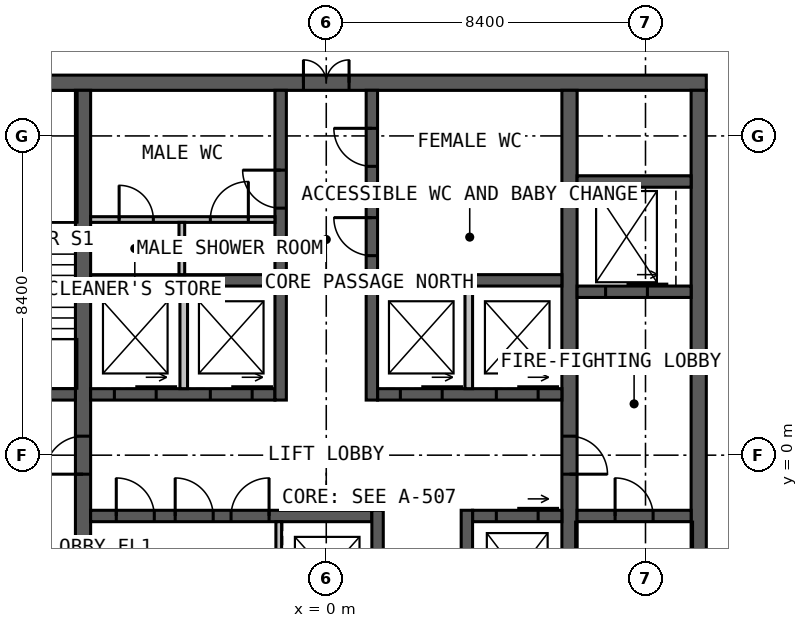
"""IFC4 building model, lengths in metres.
Left out: names, types, materials, properties, quantities, classifications, styles, units other than length and angle.
Written with IfcOpenShell. Run it as: python <this file> out.ifc"""

import sys

from ifc_helpers import new_model, si_unit, direction, frame, frame_2d, origin, place, context, subcontext, project, spatial, rectangle, extrude, element, fill, save


model = new_model("IFC4")
c1 = context("Model", 3, precision=1e-05, world=origin(), true_north=direction((0.0, 1.0)))
c2 = subcontext(c1, "Body", "Model", "MODEL_VIEW")
j1 = project(units=[si_unit("LENGTHUNIT", "METRE"), si_unit("PLANEANGLEUNIT", "RADIAN")], contexts=[c1])
p1 = place(None, origin())
s1 = spatial("IfcSite", under=j1, at=p1, CompositionType="ELEMENT")
p2 = place(p1, origin())
s2 = spatial("IfcBuilding", under=s1, at=p2, CompositionType="ELEMENT")
p3 = place(p2, frame((0.0, 0.0, 244.0)))
s3 = spatial("IfcBuildingStorey", under=s2, at=p3, CompositionType="ELEMENT", Elevation=244.0)
p4 = place(p3, frame((-10.0, 9.8, 0.0), z_axis=(0.0, 0.0, 1.0), x_axis=(1.0, 0.0, 0.0)))
e1 = element("IfcWall", 1, at=p4, inside=s3, PredefinedType="SOLIDWALL", context=c2, shape_type="SweptSolid", body=[
    extrude(rectangle(XDim=20.0, YDim=0.4, at=frame_2d((10.0, 0.0))), origin(), (0.0, 0.0, 1.0), 4.0),
])
p5 = place(p4, frame((9.4, 0.0, 0.0)))
e2 = element("IfcOpeningElement", 2, at=p5, cuts=e1, PredefinedType="OPENING", context=c2, shape_type="SweptSolid", body=[
    extrude(rectangle(XDim=1.2, YDim=2.2, at=frame_2d((0.6, 1.1))), frame((0.0, 0.21, 0.0), z_axis=(0.0, -1.0, 0.0), x_axis=(1.0, 0.0, 0.0)), (0.0, 0.0, 1.0), 0.42),
])
p6 = place(p3, frame((9.8, -9.6, 0.0), z_axis=(0.0, 0.0, 1.0), x_axis=(0.0, 1.0, 0.0)))
e3 = element("IfcWall", 3, at=p6, inside=s3, PredefinedType="SOLIDWALL", context=c2, shape_type="SweptSolid", body=[
    extrude(rectangle(XDim=19.2, YDim=0.4, at=frame_2d((9.6, 0.0))), origin(), (0.0, 0.0, 1.0), 4.0),
])
p7 = place(p3, frame((-6.4, -9.6, 0.0), z_axis=(0.0, 0.0, 1.0), x_axis=(0.0, 1.0, 0.0)))
e4 = element("IfcWall", 4, at=p7, inside=s3, PredefinedType="SOLIDWALL", context=c2, shape_type="SweptSolid", body=[
    extrude(rectangle(XDim=19.2, YDim=0.4, at=frame_2d((9.6, 0.0))), origin(), (0.0, 0.0, 1.0), 4.0),
])
p8 = place(p7, frame((9.1, 0.0, 0.0)))
e5 = element("IfcOpeningElement", 5, at=p8, cuts=e4, PredefinedType="OPENING", context=c2, shape_type="SweptSolid", body=[
    extrude(rectangle(XDim=1.0, YDim=2.2, at=frame_2d((0.5, 1.1))), frame((0.0, 0.21, 0.0), z_axis=(0.0, -1.0, 0.0), x_axis=(1.0, 0.0, 0.0)), (0.0, 0.0, 1.0), 0.42),
])
p9 = place(p3, frame((6.4, 9.6, 0.0), z_axis=(0.0, 0.0, 1.0), x_axis=(0.0, -1.0, 0.0)))
e6 = element("IfcWall", 6, at=p9, inside=s3, PredefinedType="SOLIDWALL", context=c2, shape_type="SweptSolid", body=[
    extrude(rectangle(XDim=19.2, YDim=0.4, at=frame_2d((9.6, 0.0))), origin(), (0.0, 0.0, 1.0), 4.0),
])
p10 = place(p9, frame((9.1, 0.0, 0.0)))
e7 = element("IfcOpeningElement", 7, at=p10, cuts=e6, PredefinedType="OPENING", context=c2, shape_type="SweptSolid", body=[
    extrude(rectangle(XDim=1.0, YDim=2.2, at=frame_2d((0.5, 1.1))), frame((0.0, 0.21, 0.0), z_axis=(0.0, -1.0, 0.0), x_axis=(1.0, 0.0, 0.0)), (0.0, 0.0, 1.0), 0.42),
])
p11 = place(p3, frame((-6.2, 1.6, 0.0), z_axis=(0.0, 0.0, 1.0), x_axis=(1.0, 0.0, 0.0)))
e8 = element("IfcWall", 8, at=p11, inside=s3, PredefinedType="SOLIDWALL", context=c2, shape_type="SweptSolid", body=[
    extrude(rectangle(XDim=4.85, YDim=0.3, at=frame_2d((2.425, 0.0))), origin(), (0.0, 0.0, 1.0), 4.0),
])
p12 = place(p11, frame((0.625, 0.0, 0.0)))
e9 = element("IfcOpeningElement", 9, at=p12, cuts=e8, PredefinedType="OPENING", context=c2, shape_type="SweptSolid", body=[
    extrude(rectangle(XDim=1.1, YDim=2.2, at=frame_2d((0.55, 1.1))), frame((0.0, 0.16, 0.0), z_axis=(0.0, -1.0, 0.0), x_axis=(1.0, 0.0, 0.0)), (0.0, 0.0, 1.0), 0.32),
])
p13 = place(p11, frame((3.15, 0.0, 0.0)))
e10 = element("IfcOpeningElement", 10, at=p13, cuts=e8, PredefinedType="OPENING", context=c2, shape_type="SweptSolid", body=[
    extrude(rectangle(XDim=1.1, YDim=2.2, at=frame_2d((0.55, 1.1))), frame((0.0, 0.16, 0.0), z_axis=(0.0, -1.0, 0.0), x_axis=(1.0, 0.0, 0.0)), (0.0, 0.0, 1.0), 0.32),
])
p14 = place(p3, frame((1.35, 1.6, 0.0), z_axis=(0.0, 0.0, 1.0), x_axis=(1.0, 0.0, 0.0)))
e11 = element("IfcWall", 11, at=p14, inside=s3, PredefinedType="SOLIDWALL", context=c2, shape_type="SweptSolid", body=[
    extrude(rectangle(XDim=4.85, YDim=0.3, at=frame_2d((2.425, 0.0))), origin(), (0.0, 0.0, 1.0), 4.0),
])
p15 = place(p14, frame((0.6, 0.0, 0.0)))
e12 = element("IfcOpeningElement", 12, at=p15, cuts=e11, PredefinedType="OPENING", context=c2, shape_type="SweptSolid", body=[
    extrude(rectangle(XDim=1.1, YDim=2.2, at=frame_2d((0.55, 1.1))), frame((0.0, 0.16, 0.0), z_axis=(0.0, -1.0, 0.0), x_axis=(1.0, 0.0, 0.0)), (0.0, 0.0, 1.0), 0.32),
])
p16 = place(p14, frame((3.125, 0.0, 0.0)))
e13 = element("IfcOpeningElement", 13, at=p16, cuts=e11, PredefinedType="OPENING", context=c2, shape_type="SweptSolid", body=[
    extrude(rectangle(XDim=1.1, YDim=2.2, at=frame_2d((0.55, 1.1))), frame((0.0, 0.16, 0.0), z_axis=(0.0, -1.0, 0.0), x_axis=(1.0, 0.0, 0.0)), (0.0, 0.0, 1.0), 0.32),
])
for number, where, z_axis, x_axis in (
    (14, (-6.2, 4.6, 0.0), (0.0, 0.0, 1.0), (1.0, 0.0, 0.0)),
    (15, (1.35, 4.6, 0.0), (0.0, 0.0, 1.0), (1.0, 0.0, 0.0)),
):
    element("IfcWall", number, at=place(p3, frame(where, z_axis=z_axis, x_axis=x_axis)), inside=s3, PredefinedType="SOLIDWALL", context=c2, shape_type="SweptSolid", body=[
        extrude(rectangle(XDim=4.85, YDim=0.3, at=frame_2d((2.425, 0.0))), origin(), (0.0, 0.0, 1.0), 4.0),
    ])
p17 = place(p3, frame((-1.2, 1.45, 0.0), z_axis=(0.0, 0.0, 1.0), x_axis=(0.0, 1.0, 0.0)))
e16 = element("IfcWall", 16, at=p17, inside=s3, PredefinedType="SOLIDWALL", context=c2, shape_type="SweptSolid", body=[
    extrude(rectangle(XDim=8.15, YDim=0.3, at=frame_2d((4.075, 0.0))), origin(), (0.0, 0.0, 1.0), 4.0),
])
p18 = place(p17, frame((5.05, 0.0, 0.0)))
e17 = element("IfcOpeningElement", 17, at=p18, cuts=e16, PredefinedType="OPENING", context=c2, shape_type="SweptSolid", body=[
    extrude(rectangle(XDim=1.0, YDim=2.2, at=frame_2d((0.5, 1.1))), frame((0.0, 0.16, 0.0), z_axis=(0.0, -1.0, 0.0), x_axis=(1.0, 0.0, 0.0)), (0.0, 0.0, 1.0), 0.32),
])
p19 = place(p3, frame((1.2, 1.45, 0.0), z_axis=(0.0, 0.0, 1.0), x_axis=(0.0, 1.0, 0.0)))
e18 = element("IfcWall", 18, at=p19, inside=s3, PredefinedType="SOLIDWALL", context=c2, shape_type="SweptSolid", body=[
    extrude(rectangle(XDim=8.15, YDim=0.3, at=frame_2d((4.075, 0.0))), origin(), (0.0, 0.0, 1.0), 4.0),
])
p20 = place(p19, frame((3.8, 0.0, 0.0)))
e19 = element("IfcOpeningElement", 19, at=p20, cuts=e18, PredefinedType="OPENING", context=c2, shape_type="SweptSolid", body=[
    extrude(rectangle(XDim=1.0, YDim=2.2, at=frame_2d((0.5, 1.1))), frame((0.0, 0.16, 0.0), z_axis=(0.0, -1.0, 0.0), x_axis=(1.0, 0.0, 0.0)), (0.0, 0.0, 1.0), 0.32),
])
p21 = place(p19, frame((6.15, 0.0, 0.0)))
e20 = element("IfcOpeningElement", 20, at=p21, cuts=e18, PredefinedType="OPENING", context=c2, shape_type="SweptSolid", body=[
    extrude(rectangle(XDim=1.0, YDim=2.2, at=frame_2d((0.5, 1.1))), frame((0.0, 0.16, 0.0), z_axis=(0.0, -1.0, 0.0), x_axis=(1.0, 0.0, 0.0)), (0.0, 0.0, 1.0), 0.32),
])
p22 = place(p3, frame((-6.2, -1.6, 0.0), z_axis=(0.0, 0.0, 1.0), x_axis=(1.0, 0.0, 0.0)))
e21 = element("IfcWall", 21, at=p22, inside=s3, PredefinedType="SOLIDWALL", context=c2, shape_type="SweptSolid", body=[
    extrude(rectangle(XDim=7.4, YDim=0.3, at=frame_2d((3.7, 0.0))), origin(), (0.0, 0.0, 1.0), 4.0),
])
p23 = place(p22, frame((0.675, 0.0, 0.0)))
e22 = element("IfcOpeningElement", 22, at=p23, cuts=e21, PredefinedType="OPENING", context=c2, shape_type="SweptSolid", body=[
    extrude(rectangle(XDim=1.0, YDim=2.2, at=frame_2d((0.5, 1.1))), frame((0.0, 0.16, 0.0), z_axis=(0.0, -1.0, 0.0), x_axis=(1.0, 0.0, 0.0)), (0.0, 0.0, 1.0), 0.32),
])
p24 = place(p22, frame((2.225, 0.0, 0.0)))
e23 = element("IfcOpeningElement", 23, at=p24, cuts=e21, PredefinedType="OPENING", context=c2, shape_type="SweptSolid", body=[
    extrude(rectangle(XDim=1.0, YDim=2.2, at=frame_2d((0.5, 1.1))), frame((0.0, 0.16, 0.0), z_axis=(0.0, -1.0, 0.0), x_axis=(1.0, 0.0, 0.0)), (0.0, 0.0, 1.0), 0.32),
])
p25 = place(p22, frame((3.695, 0.0, 0.0)))
e24 = element("IfcOpeningElement", 24, at=p25, cuts=e21, PredefinedType="OPENING", context=c2, shape_type="SweptSolid", body=[
    extrude(rectangle(XDim=1.0, YDim=2.2, at=frame_2d((0.5, 1.1))), frame((0.0, 0.16, 0.0), z_axis=(0.0, -1.0, 0.0), x_axis=(1.0, 0.0, 0.0)), (0.0, 0.0, 1.0), 0.32),
])
p26 = place(p3, frame((3.85, -1.6, 0.0), z_axis=(0.0, 0.0, 1.0), x_axis=(1.0, 0.0, 0.0)))
e25 = element("IfcWall", 25, at=p26, inside=s3, PredefinedType="SOLIDWALL", context=c2, shape_type="SweptSolid", body=[
    extrude(rectangle(XDim=2.35, YDim=0.3, at=frame_2d((1.175, 0.0))), origin(), (0.0, 0.0, 1.0), 4.0),
])
p27 = place(p26, frame((0.625, 0.0, 0.0)))
e26 = element("IfcOpeningElement", 26, at=p27, cuts=e25, PredefinedType="OPENING", context=c2, shape_type="SweptSolid", body=[
    extrude(rectangle(XDim=1.1, YDim=2.2, at=frame_2d((0.55, 1.1))), frame((0.0, 0.16, 0.0), z_axis=(0.0, -1.0, 0.0), x_axis=(1.0, 0.0, 0.0)), (0.0, 0.0, 1.0), 0.32),
])
p28 = place(p3, frame((1.35, -1.45, 0.0), z_axis=(0.0, 0.0, 1.0), x_axis=(0.0, -1.0, 0.0)))
e27 = element("IfcWall", 27, at=p28, inside=s3, PredefinedType="SOLIDWALL", context=c2, shape_type="SweptSolid", body=[
    extrude(rectangle(XDim=8.15, YDim=0.3, at=frame_2d((4.075, 0.0))), origin(), (0.0, 0.0, 1.0), 4.0),
])
p29 = place(p28, frame((6.0, 0.0, 0.0)))
e28 = element("IfcOpeningElement", 28, at=p29, cuts=e27, PredefinedType="OPENING", context=c2, shape_type="SweptSolid", body=[
    extrude(rectangle(XDim=1.0, YDim=2.2, at=frame_2d((0.5, 1.1))), frame((0.0, 0.16, 0.0), z_axis=(0.0, -1.0, 0.0), x_axis=(1.0, 0.0, 0.0)), (0.0, 0.0, 1.0), 0.32),
])
p30 = place(p28, frame((3.525, 0.0, 0.0)))
e29 = element("IfcOpeningElement", 29, at=p30, cuts=e27, PredefinedType="OPENING", context=c2, shape_type="SweptSolid", body=[
    extrude(rectangle(XDim=0.9, YDim=2.2, at=frame_2d((0.45, 1.1))), frame((0.0, 0.16, 0.0), z_axis=(0.0, -1.0, 0.0), x_axis=(1.0, 0.0, 0.0)), (0.0, 0.0, 1.0), 0.32),
])
p31 = place(p3, frame((3.7, -1.45, 0.0), z_axis=(0.0, 0.0, 1.0), x_axis=(0.0, -1.0, 0.0)))
e30 = element("IfcWall", 30, at=p31, inside=s3, PredefinedType="SOLIDWALL", context=c2, shape_type="SweptSolid", body=[
    extrude(rectangle(XDim=8.15, YDim=0.3, at=frame_2d((4.075, 0.0))), origin(), (0.0, 0.0, 1.0), 4.0),
])
p32 = place(p31, frame((5.1, 0.0, 0.0)))
e31 = element("IfcOpeningElement", 31, at=p32, cuts=e30, PredefinedType="OPENING", context=c2, shape_type="SweptSolid", body=[
    extrude(rectangle(XDim=0.9, YDim=2.2, at=frame_2d((0.45, 1.1))), frame((0.0, 0.16, 0.0), z_axis=(0.0, -1.0, 0.0), x_axis=(1.0, 0.0, 0.0)), (0.0, 0.0, 1.0), 0.32),
])
p33 = place(p3, frame((-9.6, 1.6, 0.0), z_axis=(0.0, 0.0, 1.0), x_axis=(1.0, 0.0, 0.0)))
e32 = element("IfcWall", 32, at=p33, inside=s3, PredefinedType="SOLIDWALL", context=c2, shape_type="SweptSolid", body=[
    extrude(rectangle(XDim=3.0, YDim=0.3, at=frame_2d((1.5, 0.0))), origin(), (0.0, 0.0, 1.0), 4.0),
])
p34 = place(p33, frame((1.0, 0.0, 0.0)))
e33 = element("IfcOpeningElement", 33, at=p34, cuts=e32, PredefinedType="OPENING", context=c2, shape_type="SweptSolid", body=[
    extrude(rectangle(XDim=1.0, YDim=2.2, at=frame_2d((0.5, 1.1))), frame((0.0, 0.16, 0.0), z_axis=(0.0, -1.0, 0.0), x_axis=(1.0, 0.0, 0.0)), (0.0, 0.0, 1.0), 0.32),
])
p35 = place(p3, frame((6.6, -1.6, 0.0), z_axis=(0.0, 0.0, 1.0), x_axis=(1.0, 0.0, 0.0)))
e34 = element("IfcWall", 34, at=p35, inside=s3, PredefinedType="SOLIDWALL", context=c2, shape_type="SweptSolid", body=[
    extrude(rectangle(XDim=3.0, YDim=0.3, at=frame_2d((1.5, 0.0))), origin(), (0.0, 0.0, 1.0), 4.0),
])
p36 = place(p35, frame((1.0, 0.0, 0.0)))
e35 = element("IfcOpeningElement", 35, at=p36, cuts=e34, PredefinedType="OPENING", context=c2, shape_type="SweptSolid", body=[
    extrude(rectangle(XDim=1.0, YDim=2.2, at=frame_2d((0.5, 1.1))), frame((0.0, 0.16, 0.0), z_axis=(0.0, -1.0, 0.0), x_axis=(1.0, 0.0, 0.0)), (0.0, 0.0, 1.0), 0.32),
])
p37 = place(p3, frame((6.6, 4.3, 0.0), z_axis=(0.0, 0.0, 1.0), x_axis=(1.0, 0.0, 0.0)))
e36 = element("IfcWall", 36, at=p37, inside=s3, PredefinedType="SOLIDWALL", context=c2, shape_type="SweptSolid", body=[
    extrude(rectangle(XDim=3.0, YDim=0.3, at=frame_2d((1.5, 0.0))), origin(), (0.0, 0.0, 1.0), 4.0),
])
p38 = place(p37, frame((0.75, 0.0, 0.0)))
e37 = element("IfcOpeningElement", 37, at=p38, cuts=e36, PredefinedType="OPENING", context=c2, shape_type="SweptSolid", body=[
    extrude(rectangle(XDim=1.1, YDim=2.2, at=frame_2d((0.55, 1.1))), frame((0.0, 0.16, 0.0), z_axis=(0.0, -1.0, 0.0), x_axis=(1.0, 0.0, 0.0)), (0.0, 0.0, 1.0), 0.32),
])
p39 = place(p3, frame((6.6, 7.2, 0.0), z_axis=(0.0, 0.0, 1.0), x_axis=(1.0, 0.0, 0.0)))
e38 = element("IfcWall", 38, at=p39, inside=s3, PredefinedType="SOLIDWALL", context=c2, shape_type="SweptSolid", body=[
    extrude(rectangle(XDim=3.0, YDim=0.3, at=frame_2d((1.5, 0.0))), origin(), (0.0, 0.0, 1.0), 4.0),
])
for number, where, z_axis, x_axis in (
    (39, (-3.75, 1.75, 0.0), (0.0, 0.0, 1.0), (0.0, 1.0, 0.0)),
    (40, (3.75, 1.75, 0.0), (0.0, 0.0, 1.0), (0.0, 1.0, 0.0)),
):
    element("IfcWall", number, at=place(p3, frame(where, z_axis=z_axis, x_axis=x_axis)), inside=s3, PredefinedType="SOLIDWALL", context=c2, shape_type="SweptSolid", body=[
        extrude(rectangle(XDim=2.7, YDim=0.2, at=frame_2d((1.35, 0.0))), origin(), (0.0, 0.0, 1.0), 3.75),
    ])
p40 = place(p3, frame((1.35, 6.8, 0.0), z_axis=(0.0, 0.0, 1.0), x_axis=(1.0, 0.0, 0.0)))
e41 = element("IfcWall", 41, at=p40, inside=s3, PredefinedType="PARTITIONING", context=c2, shape_type="SweptSolid", body=[
    extrude(rectangle(XDim=4.85, YDim=0.15, at=frame_2d((2.425, 0.0))), origin(), (0.0, 0.0, 1.0), 3.75),
])
p41 = place(p3, frame((-6.2, 6.2, 0.0), z_axis=(0.0, 0.0, 1.0), x_axis=(1.0, 0.0, 0.0)))
e42 = element("IfcWall", 42, at=p41, inside=s3, PredefinedType="PARTITIONING", context=c2, shape_type="SweptSolid", body=[
    extrude(rectangle(XDim=4.85, YDim=0.15, at=frame_2d((2.425, 0.0))), origin(), (0.0, 0.0, 1.0), 3.75),
])
p42 = place(p41, frame((3.15, 0.0, 0.0)))
e43 = element("IfcOpeningElement", 43, at=p42, cuts=e42, PredefinedType="OPENING", context=c2, shape_type="SweptSolid", body=[
    extrude(rectangle(XDim=1.0, YDim=2.2, at=frame_2d((0.5, 1.1))), frame((0.0, 0.085, 0.0), z_axis=(0.0, -1.0, 0.0), x_axis=(1.0, 0.0, 0.0)), (0.0, 0.0, 1.0), 0.17),
])
p43 = place(p41, frame((0.75, 0.0, 0.0)))
e44 = element("IfcOpeningElement", 44, at=p43, cuts=e42, PredefinedType="OPENING", context=c2, shape_type="SweptSolid", body=[
    extrude(rectangle(XDim=0.9, YDim=2.2, at=frame_2d((0.45, 1.1))), frame((0.0, 0.085, 0.0), z_axis=(0.0, -1.0, 0.0), x_axis=(1.0, 0.0, 0.0)), (0.0, 0.0, 1.0), 0.17),
])
p44 = place(p3, frame((-3.8, 4.75, 0.0), z_axis=(0.0, 0.0, 1.0), x_axis=(0.0, 1.0, 0.0)))
e45 = element("IfcWall", 45, at=p44, inside=s3, PredefinedType="PARTITIONING", context=c2, shape_type="SweptSolid", body=[
    extrude(rectangle(XDim=1.375, YDim=0.15, at=frame_2d((0.688, 0.0))), origin(), (0.0, 0.0, 1.0), 3.75),
])
p45 = place(p3, frame((-1.25, -1.75, 0.0), z_axis=(0.0, 0.0, 1.0), x_axis=(0.0, -1.0, 0.0)))
e46 = element("IfcWall", 46, at=p45, inside=s3, PredefinedType="PARTITIONING", context=c2, shape_type="SweptSolid", body=[
    extrude(rectangle(XDim=2.7, YDim=0.15, at=frame_2d((1.35, 0.0))), origin(), (0.0, 0.0, 1.0), 3.75),
])
p46 = place(p5, origin())
e47 = element("IfcDoor", 47, at=p46, inside=s3, OperationType="DOUBLE_DOOR_SINGLE_SWING", PredefinedType="DOOR", context=c2, shape_type="SweptSolid", body=[
    extrude(rectangle(XDim=1.2, YDim=2.2, at=frame_2d((0.6, 1.1))), frame((0.0, 0.025, 0.0), z_axis=(0.0, -1.0, 0.0), x_axis=(1.0, 0.0, 0.0)), (0.0, 0.0, 1.0), 0.05),
])
fill(e2, e47)
p47 = place(p8, origin())
e48 = element("IfcDoor", 48, at=p47, inside=s3, OperationType="SINGLE_SWING_LEFT", PredefinedType="DOOR", context=c2, shape_type="SweptSolid", body=[
    extrude(rectangle(XDim=1.0, YDim=2.2, at=frame_2d((0.5, 1.1))), frame((0.0, 0.025, 0.0), z_axis=(0.0, -1.0, 0.0), x_axis=(1.0, 0.0, 0.0)), (0.0, 0.0, 1.0), 0.05),
])
fill(e5, e48)
p48 = place(p10, origin())
e49 = element("IfcDoor", 49, at=p48, inside=s3, OperationType="SINGLE_SWING_RIGHT", PredefinedType="DOOR", context=c2, shape_type="SweptSolid", body=[
    extrude(rectangle(XDim=1.0, YDim=2.2, at=frame_2d((0.5, 1.1))), frame((0.0, 0.025, 0.0), z_axis=(0.0, -1.0, 0.0), x_axis=(1.0, 0.0, 0.0)), (0.0, 0.0, 1.0), 0.05),
])
fill(e7, e49)
p49 = place(p36, origin())
e50 = element("IfcDoor", 50, at=p49, inside=s3, OperationType="SINGLE_SWING_LEFT", PredefinedType="DOOR", context=c2, shape_type="SweptSolid", body=[
    extrude(rectangle(XDim=1.0, YDim=2.2, at=frame_2d((0.5, 1.1))), frame((0.0, 0.025, 0.0), z_axis=(0.0, -1.0, 0.0), x_axis=(1.0, 0.0, 0.0)), (0.0, 0.0, 1.0), 0.05),
])
fill(e35, e50)
p50 = place(p18, origin())
e51 = element("IfcDoor", 51, at=p50, inside=s3, OperationType="SINGLE_SWING_RIGHT", PredefinedType="DOOR", context=c2, shape_type="SweptSolid", body=[
    extrude(rectangle(XDim=1.0, YDim=2.2, at=frame_2d((0.5, 1.1))), frame((0.0, 0.025, 0.0), z_axis=(0.0, -1.0, 0.0), x_axis=(1.0, 0.0, 0.0)), (0.0, 0.0, 1.0), 0.05),
])
fill(e17, e51)
p51 = place(p20, origin())
e52 = element("IfcDoor", 52, at=p51, inside=s3, OperationType="SINGLE_SWING_RIGHT", PredefinedType="DOOR", context=c2, shape_type="SweptSolid", body=[
    extrude(rectangle(XDim=1.0, YDim=2.2, at=frame_2d((0.5, 1.1))), frame((0.0, 0.025, 0.0), z_axis=(0.0, -1.0, 0.0), x_axis=(1.0, 0.0, 0.0)), (0.0, 0.0, 1.0), 0.05),
])
fill(e19, e52)
p52 = place(p21, origin())
e53 = element("IfcDoor", 53, at=p52, inside=s3, OperationType="SINGLE_SWING_RIGHT", PredefinedType="DOOR", context=c2, shape_type="SweptSolid", body=[
    extrude(rectangle(XDim=1.0, YDim=2.2, at=frame_2d((0.5, 1.1))), frame((0.0, 0.025, 0.0), z_axis=(0.0, -1.0, 0.0), x_axis=(1.0, 0.0, 0.0)), (0.0, 0.0, 1.0), 0.05),
])
fill(e20, e53)
p53 = place(p42, origin())
e54 = element("IfcDoor", 54, at=p53, inside=s3, OperationType="SINGLE_SWING_RIGHT", PredefinedType="DOOR", context=c2, shape_type="SweptSolid", body=[
    extrude(rectangle(XDim=1.0, YDim=2.2, at=frame_2d((0.5, 1.1))), frame((0.0, 0.025, 0.0), z_axis=(0.0, -1.0, 0.0), x_axis=(1.0, 0.0, 0.0)), (0.0, 0.0, 1.0), 0.05),
])
fill(e43, e54)
p54 = place(p43, origin())
e55 = element("IfcDoor", 55, at=p54, inside=s3, OperationType="SINGLE_SWING_LEFT", PredefinedType="DOOR", context=c2, shape_type="SweptSolid", body=[
    extrude(rectangle(XDim=0.9, YDim=2.2, at=frame_2d((0.45, 1.1))), frame((0.0, 0.025, 0.0), z_axis=(0.0, -1.0, 0.0), x_axis=(1.0, 0.0, 0.0)), (0.0, 0.0, 1.0), 0.05),
])
fill(e44, e55)
p55 = place(p23, origin())
e56 = element("IfcDoor", 56, at=p55, inside=s3, OperationType="SINGLE_SWING_LEFT", PredefinedType="DOOR", context=c2, shape_type="SweptSolid", body=[
    extrude(rectangle(XDim=1.0, YDim=2.2, at=frame_2d((0.5, 1.1))), frame((0.0, 0.025, 0.0), z_axis=(0.0, -1.0, 0.0), x_axis=(1.0, 0.0, 0.0)), (0.0, 0.0, 1.0), 0.05),
])
fill(e22, e56)
p56 = place(p24, origin())
e57 = element("IfcDoor", 57, at=p56, inside=s3, OperationType="SINGLE_SWING_LEFT", PredefinedType="DOOR", context=c2, shape_type="SweptSolid", body=[
    extrude(rectangle(XDim=1.0, YDim=2.2, at=frame_2d((0.5, 1.1))), frame((0.0, 0.025, 0.0), z_axis=(0.0, -1.0, 0.0), x_axis=(1.0, 0.0, 0.0)), (0.0, 0.0, 1.0), 0.05),
])
fill(e23, e57)
p57 = place(p25, origin())
e58 = element("IfcDoor", 58, at=p57, inside=s3, OperationType="SINGLE_SWING_RIGHT", PredefinedType="DOOR", context=c2, shape_type="SweptSolid", body=[
    extrude(rectangle(XDim=1.0, YDim=2.2, at=frame_2d((0.5, 1.1))), frame((0.0, 0.025, 0.0), z_axis=(0.0, -1.0, 0.0), x_axis=(1.0, 0.0, 0.0)), (0.0, 0.0, 1.0), 0.05),
])
fill(e24, e58)
p58 = place(p12, origin())
e59 = element("IfcDoor", 59, at=p58, inside=s3, OperationType="SLIDING_TO_LEFT", PredefinedType="DOOR", context=c2, shape_type="SweptSolid", body=[
    extrude(rectangle(XDim=1.1, YDim=2.2, at=frame_2d((0.55, 1.1))), frame((0.0, 0.025, 0.0), z_axis=(0.0, -1.0, 0.0), x_axis=(1.0, 0.0, 0.0)), (0.0, 0.0, 1.0), 0.05),
])
fill(e9, e59)
p59 = place(p13, origin())
e60 = element("IfcDoor", 60, at=p59, inside=s3, OperationType="SLIDING_TO_LEFT", PredefinedType="DOOR", context=c2, shape_type="SweptSolid", body=[
    extrude(rectangle(XDim=1.1, YDim=2.2, at=frame_2d((0.55, 1.1))), frame((0.0, 0.025, 0.0), z_axis=(0.0, -1.0, 0.0), x_axis=(1.0, 0.0, 0.0)), (0.0, 0.0, 1.0), 0.05),
])
fill(e10, e60)
p60 = place(p15, origin())
e61 = element("IfcDoor", 61, at=p60, inside=s3, OperationType="SLIDING_TO_LEFT", PredefinedType="DOOR", context=c2, shape_type="SweptSolid", body=[
    extrude(rectangle(XDim=1.1, YDim=2.2, at=frame_2d((0.55, 1.1))), frame((0.0, 0.025, 0.0), z_axis=(0.0, -1.0, 0.0), x_axis=(1.0, 0.0, 0.0)), (0.0, 0.0, 1.0), 0.05),
])
fill(e12, e61)
p61 = place(p16, origin())
e62 = element("IfcDoor", 62, at=p61, inside=s3, OperationType="SLIDING_TO_LEFT", PredefinedType="DOOR", context=c2, shape_type="SweptSolid", body=[
    extrude(rectangle(XDim=1.1, YDim=2.2, at=frame_2d((0.55, 1.1))), frame((0.0, 0.025, 0.0), z_axis=(0.0, -1.0, 0.0), x_axis=(1.0, 0.0, 0.0)), (0.0, 0.0, 1.0), 0.05),
])
fill(e13, e62)
p62 = place(p27, origin())
e63 = element("IfcDoor", 63, at=p62, inside=s3, OperationType="SLIDING_TO_LEFT", PredefinedType="DOOR", context=c2, shape_type="SweptSolid", body=[
    extrude(rectangle(XDim=1.1, YDim=2.2, at=frame_2d((0.55, 1.1))), frame((0.0, 0.025, 0.0), z_axis=(0.0, -1.0, 0.0), x_axis=(1.0, 0.0, 0.0)), (0.0, 0.0, 1.0), 0.05),
])
fill(e26, e63)
p63 = place(p38, origin())
e64 = element("IfcDoor", 64, at=p63, inside=s3, OperationType="SLIDING_TO_LEFT", PredefinedType="DOOR", context=c2, shape_type="SweptSolid", body=[
    extrude(rectangle(XDim=1.1, YDim=2.2, at=frame_2d((0.55, 1.1))), frame((0.0, 0.025, 0.0), z_axis=(0.0, -1.0, 0.0), x_axis=(1.0, 0.0, 0.0)), (0.0, 0.0, 1.0), 0.05),
])
fill(e37, e64)
save(model, sys.argv[1])
